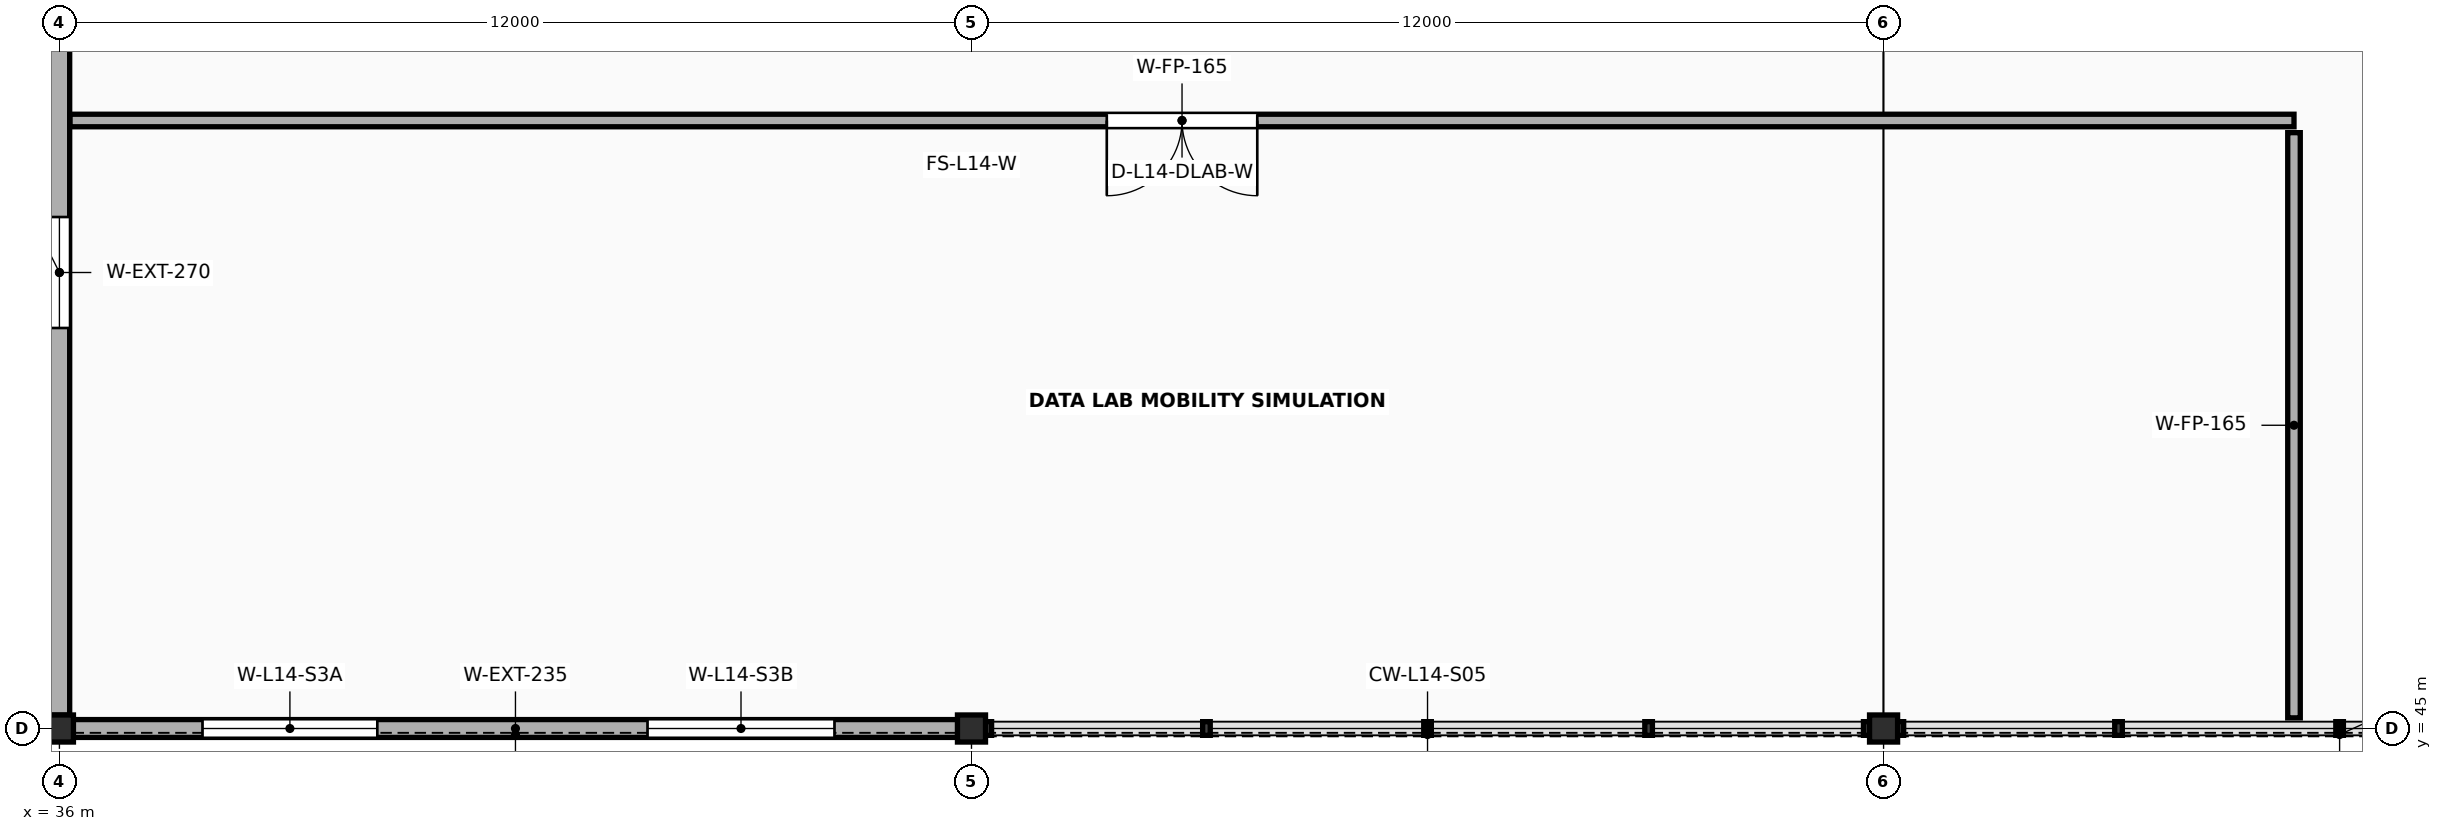
"""IFC4 building model, lengths in metres.
Left out: names, types, materials, properties, quantities, classifications, styles, units other than length and angle.
Written with IfcOpenShell. Run it as: python <this file> out.ifc"""

import sys

from ifc_helpers import new_model, si_unit, direction, frame, frame_2d, origin, origin_2d, place, context, subcontext, project, spatial, rectangle, i_section, extrude, element, fill, save


model = new_model("IFC4")
c1 = context("Model", 3, precision=1e-05, world=origin(), true_north=direction((0.0, 1.0)))
c2 = subcontext(c1, "Body", "Model", "MODEL_VIEW")
j1 = project(units=[si_unit("LENGTHUNIT", "METRE"), si_unit("PLANEANGLEUNIT", "RADIAN")], contexts=[c1])
p1 = place(None, origin())
s1 = spatial("IfcSite", under=j1, at=p1, CompositionType="ELEMENT")
p2 = place(p1, origin())
s2 = spatial("IfcBuilding", under=s1, at=p2, CompositionType="ELEMENT")
p3 = place(p2, frame((0.0, 0.0, 57.6)))
s3 = spatial("IfcBuildingStorey", under=s2, at=p3, CompositionType="ELEMENT", Elevation=57.6)
for number, where, z_axis, x_axis in (
    (1, (36.0, 45.0, 0.0), (0.0, 0.0, 1.0), (1.0, 0.0, 0.0)),
    (2, (48.0, 45.0, 0.0), (0.0, 0.0, 1.0), (1.0, 0.0, 0.0)),
    (3, (60.0, 45.0, 0.0), (0.0, 0.0, 1.0), (1.0, 0.0, 0.0)),
):
    element("IfcColumn", number, at=place(p3, frame(where, z_axis=z_axis, x_axis=x_axis)), inside=s3, PredefinedType="COLUMN", context=c2, shape_type="SweptSolid", body=[
        extrude(i_section(OverallWidth=0.369, OverallDepth=0.356, WebThickness=0.011, FlangeThickness=0.018, FilletRadius=0.018, at=origin_2d()), origin(), (0.0, 0.0, 1.0), 4.0),
    ])
p4 = place(p3, frame((36.183, 45.0, 0.0), z_axis=(0.0, 0.0, 1.0), x_axis=(1.0, 0.0, 0.0)))
e4 = element("IfcWall", 4, at=p4, inside=s3, PredefinedType="SOLIDWALL", context=c2, shape_type="SweptSolid", body=[
    extrude(rectangle(XDim=11.635, YDim=0.235, at=frame_2d((5.817, 0.0))), origin(), (0.0, 0.0, 1.0), 3.216),
])
p5 = place(p4, frame((1.7, 0.0, 0.78)))
e5 = element("IfcOpeningElement", 5, at=p5, cuts=e4, PredefinedType="OPENING", context=c2, shape_type="SweptSolid", body=[
    extrude(rectangle(XDim=2.3, YDim=1.58, at=frame_2d((1.15, 0.79))), frame((0.0, 0.133, 0.0), z_axis=(0.0, -1.0, 0.0), x_axis=(1.0, 0.0, 0.0)), (0.0, 0.0, 1.0), 0.265),
])
p6 = place(p4, frame((7.555, 0.0, 0.78)))
e6 = element("IfcOpeningElement", 6, at=p6, cuts=e4, PredefinedType="OPENING", context=c2, shape_type="SweptSolid", body=[
    extrude(rectangle(XDim=2.46, YDim=1.58, at=frame_2d((1.23, 0.79))), frame((0.0, 0.133, 0.0), z_axis=(0.0, -1.0, 0.0), x_axis=(1.0, 0.0, 0.0)), (0.0, 0.0, 1.0), 0.265),
])
p7 = place(p3, frame((36.0, 45.176, 0.0), z_axis=(0.0, 0.0, 1.0), x_axis=(0.0, 1.0, 0.0)))
e7 = element("IfcWall", 7, at=p7, inside=s3, PredefinedType="SOLIDWALL", context=c2, shape_type="SweptSolid", body=[
    extrude(rectangle(XDim=11.648, YDim=0.27, at=frame_2d((5.824, 0.0))), origin(), (0.0, 0.0, 1.0), 3.216),
])
p8 = place(p7, frame((5.094, 0.0, 0.78)))
e8 = element("IfcOpeningElement", 8, at=p8, cuts=e7, PredefinedType="OPENING", context=c2, shape_type="SweptSolid", body=[
    extrude(rectangle(XDim=1.46, YDim=1.74, at=frame_2d((0.73, 0.87))), frame((0.0, 0.15, 0.0), z_axis=(0.0, -1.0, 0.0), x_axis=(1.0, 0.0, 0.0)), (0.0, 0.0, 1.0), 0.3),
])
p9 = place(p3, frame((36.14, 53.0, 0.0), z_axis=(0.0, 0.0, 1.0), x_axis=(1.0, 0.0, 0.0)))
e9 = element("IfcWall", 9, at=p9, inside=s3, PredefinedType="PARTITIONING", context=c2, shape_type="SweptSolid", body=[
    extrude(rectangle(XDim=29.26, YDim=0.165, at=frame_2d((14.63, 0.0))), origin(), (0.0, 0.0, 1.0), 2.88),
])
p10 = place(p9, frame((13.64, 0.0, 0.0)))
e10 = element("IfcOpeningElement", 10, at=p10, cuts=e9, PredefinedType="OPENING", context=c2, shape_type="SweptSolid", body=[
    extrude(rectangle(XDim=1.98, YDim=2.4, at=frame_2d((0.99, 1.2))), frame((0.0, 0.097, 0.0), z_axis=(0.0, -1.0, 0.0), x_axis=(1.0, 0.0, 0.0)), (0.0, 0.0, 1.0), 0.195),
])
p11 = place(p3, frame((65.4, 45.14, 0.0), z_axis=(0.0, 0.0, 1.0), x_axis=(0.0, 1.0, 0.0)))
e11 = element("IfcWall", 11, at=p11, inside=s3, PredefinedType="PARTITIONING", context=c2, shape_type="SweptSolid", body=[
    extrude(rectangle(XDim=7.7, YDim=0.165, at=frame_2d((3.85, 0.0))), origin(), (0.0, 0.0, 1.0), 2.88),
])
p12 = place(p5, origin())
e12 = element("IfcWindow", 12, at=p12, inside=s3, PartitioningType="DOUBLE_PANEL_VERTICAL", PredefinedType="WINDOW", context=c2, shape_type="SweptSolid", body=[
    extrude(rectangle(XDim=2.3, YDim=1.58, at=frame_2d((1.15, 0.79))), frame((0.0, 0.03, 0.0), z_axis=(0.0, -1.0, 0.0), x_axis=(1.0, 0.0, 0.0)), (0.0, 0.0, 1.0), 0.06),
])
fill(e5, e12)
p13 = place(p6, origin())
e13 = element("IfcWindow", 13, at=p13, inside=s3, PartitioningType="DOUBLE_PANEL_VERTICAL", PredefinedType="WINDOW", context=c2, shape_type="SweptSolid", body=[
    extrude(rectangle(XDim=2.46, YDim=1.58, at=frame_2d((1.23, 0.79))), frame((0.0, 0.03, 0.0), z_axis=(0.0, -1.0, 0.0), x_axis=(1.0, 0.0, 0.0)), (0.0, 0.0, 1.0), 0.06),
])
fill(e6, e13)
p14 = place(p8, origin())
e14 = element("IfcWindow", 14, at=p14, inside=s3, PartitioningType="SINGLE_PANEL", PredefinedType="WINDOW", context=c2, shape_type="SweptSolid", body=[
    extrude(rectangle(XDim=1.46, YDim=1.74, at=frame_2d((0.73, 0.87))), frame((0.0, 0.03, 0.0), z_axis=(0.0, -1.0, 0.0), x_axis=(1.0, 0.0, 0.0)), (0.0, 0.0, 1.0), 0.06),
])
fill(e8, e14)
p15 = place(p10, origin())
e15 = element("IfcDoor", 15, at=p15, inside=s3, OperationType="DOUBLE_DOOR_SINGLE_SWING", PredefinedType="DOOR", context=c2, shape_type="SweptSolid", body=[
    extrude(rectangle(XDim=1.98, YDim=2.4, at=frame_2d((0.99, 1.2))), frame((0.0, 0.025, 0.0), z_axis=(0.0, -1.0, 0.0), x_axis=(1.0, 0.0, 0.0)), (0.0, 0.0, 1.0), 0.05),
])
fill(e10, e15)
save(model, sys.argv[1])
